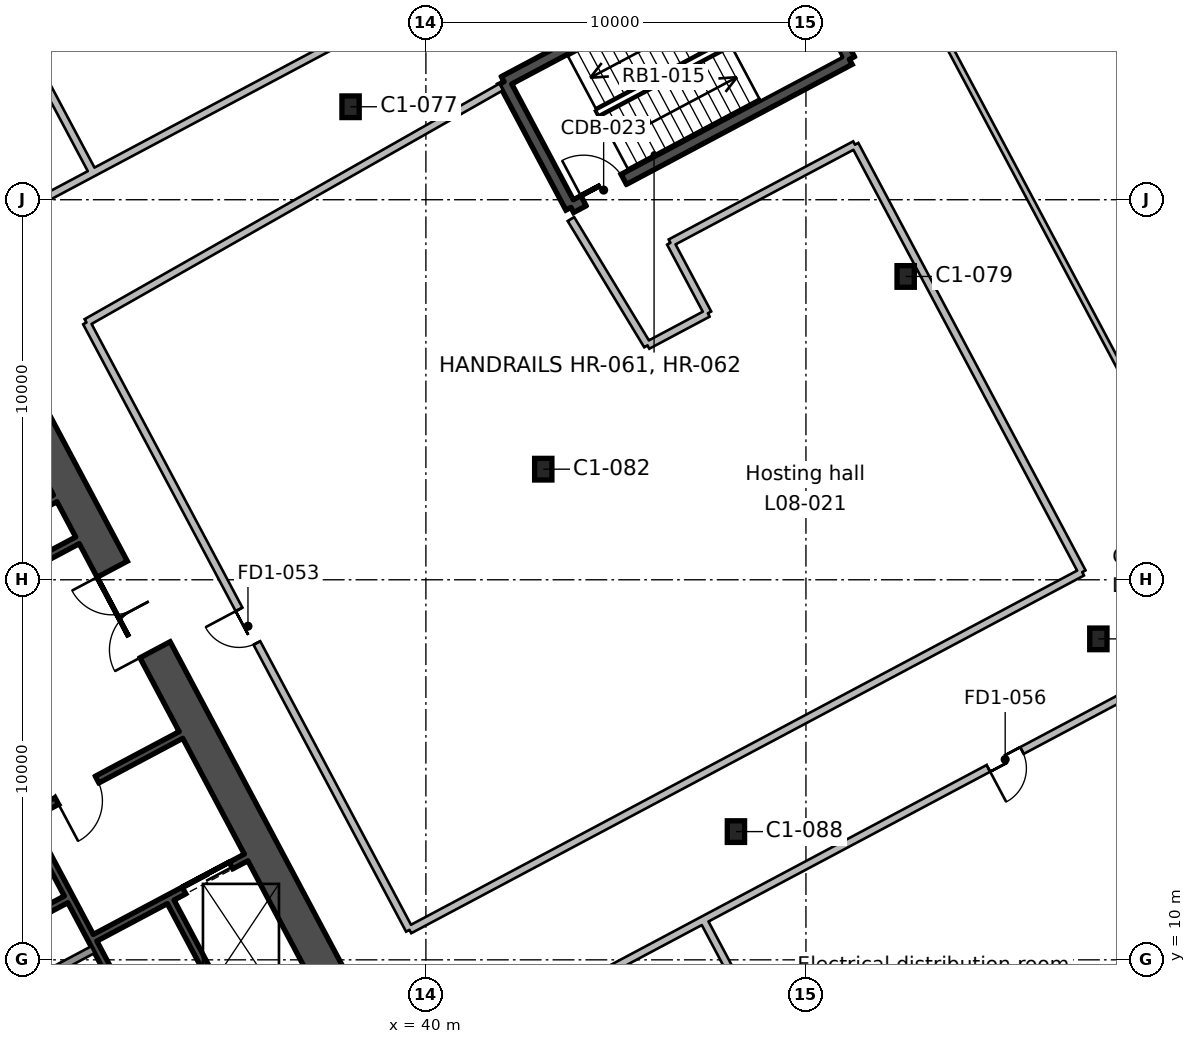
"""IFC4 building model, lengths in metres.
Left out: names, types, materials, properties, quantities, classifications, styles, units other than length and angle.
Written with IfcOpenShell. Run it as: python <this file> out.ifc"""

import sys

from ifc_helpers import new_model, si_unit, direction, frame, frame_2d, origin, origin_2d, place, context, subcontext, project, spatial, rectangle, i_section, extrude, element, fill, save


model = new_model("IFC4")
c1 = context("Model", 3, precision=1e-05, world=origin(), true_north=direction((0.0, 1.0)))
c2 = subcontext(c1, "Body", "Model", "MODEL_VIEW")
j1 = project(units=[si_unit("LENGTHUNIT", "METRE"), si_unit("PLANEANGLEUNIT", "RADIAN")], contexts=[c1])
p1 = place(None, origin())
s1 = spatial("IfcSite", under=j1, at=p1, CompositionType="ELEMENT")
p2 = place(p1, origin())
s2 = spatial("IfcBuilding", under=s1, at=p2, CompositionType="ELEMENT")
p3 = place(p2, frame((0.0, 0.0, 44.6)))
s3 = spatial("IfcBuildingStorey", under=s2, at=p3, CompositionType="ELEMENT", Elevation=44.6)
for number, where, z_axis, x_axis in (
    (1, (48.158, 13.374, 0.0), (0.0, 0.0, 1.0), (1.0, 0.0, 0.0)),
    (2, (57.694, 18.445, 0.0), (0.0, 0.0, 1.0), (1.0, 0.0, 0.0)),
    (3, (43.088, 22.91, 0.0), (0.0, 0.0, 1.0), (1.0, 0.0, 0.0)),
    (4, (52.624, 27.981, 0.0), (0.0, 0.0, 1.0), (1.0, 0.0, 0.0)),
    (5, (38.018, 32.446, 0.0), (0.0, 0.0, 1.0), (1.0, 0.0, 0.0)),
):
    element("IfcColumn", number, at=place(p3, frame(where, z_axis=z_axis, x_axis=x_axis)), inside=s3, PredefinedType="COLUMN", context=c2, shape_type="SweptSolid", body=[
        extrude(i_section(OverallWidth=0.455, OverallDepth=0.569, WebThickness=0.078, FlangeThickness=0.125, FilletRadius=0.015, at=origin_2d()), origin(), (0.0, 0.0, 1.0), 5.4),
    ])
p4 = place(p3, frame((37.849, 8.799, 0.0), z_axis=(0.0, 0.0, 1.0), x_axis=(-0.469465789982, 0.882950662289, 0.0)))
e6 = element("IfcWall", 6, at=p4, inside=s3, PredefinedType="SHEAR", context=c2, shape_type="SweptSolid", body=[
    extrude(rectangle(XDim=20.0, YDim=0.9, at=frame_2d((10.0, 0.0))), origin(), (0.0, 0.0, 1.0), 5.4),
])
p5 = place(p4, frame((10.6, 0.0, 0.0)))
e7 = element("IfcOpeningElement", 7, at=p5, cuts=e6, PredefinedType="OPENING", context=c2, shape_type="SweptSolid", body=[
    extrude(rectangle(XDim=2.4, YDim=2.4, at=frame_2d((1.2, 1.2))), frame((0.0, 0.46, 0.0), z_axis=(0.0, -1.0, 0.0), x_axis=(1.0, 0.0, 0.0)), (0.0, 0.0, 1.0), 0.92),
])
p6 = place(p3, frame((32.968, 7.223, 0.0), z_axis=(0.0, 0.0, 1.0), x_axis=(-0.469480409012, 0.88294288918, 0.0)))
e8 = element("IfcWall", 8, at=p6, inside=s3, PredefinedType="SHEAR", context=c2, shape_type="SweptSolid", body=[
    extrude(rectangle(XDim=7.3, YDim=0.2, at=frame_2d((3.65, 0.0))), origin(), (0.0, 0.0, 1.0), 5.4),
])
p7 = place(p3, frame((34.999, 8.303, 0.0), z_axis=(0.0, 0.0, 1.0), x_axis=(-0.4694665462, 0.882950260207, 0.0)))
e9 = element("IfcWall", 9, at=p7, inside=s3, PredefinedType="SHEAR", context=c2, shape_type="SweptSolid", body=[
    extrude(rectangle(XDim=3.65, YDim=0.2, at=frame_2d((1.825, 0.0))), origin(), (0.0, 0.0, 1.0), 5.4),
])
p8 = place(p3, frame((26.645, 7.825, 0.0), z_axis=(0.0, 0.0, 1.0), x_axis=(0.882953967957, 0.469459572775, 0.0)))
e10 = element("IfcWall", 10, at=p8, inside=s3, PredefinedType="SOLIDWALL", context=c2, shape_type="SweptSolid", body=[
    extrude(rectangle(XDim=5.2, YDim=0.2, at=frame_2d((2.6, 0.0))), origin(), (0.0, 0.0, 1.0), 5.4),
])
p9 = place(p3, frame((31.296, 10.581, 0.0), z_axis=(0.0, 0.0, 1.0), x_axis=(0.882960433586, 0.469447412093, 0.0)))
e11 = element("IfcWall", 11, at=p9, inside=s3, PredefinedType="SHEAR", context=c2, shape_type="SweptSolid", body=[
    extrude(rectangle(XDim=4.5, YDim=0.2, at=frame_2d((2.25, 0.0))), origin(), (0.0, 0.0, 1.0), 5.4),
])
p10 = place(p9, frame((2.65, 0.0, 0.0)))
e12 = element("IfcOpeningElement", 12, at=p10, cuts=e11, PredefinedType="OPENING", context=c2, shape_type="SweptSolid", body=[
    extrude(rectangle(XDim=1.4, YDim=2.4, at=frame_2d((0.7, 1.2))), frame((0.0, 0.11, 0.0), z_axis=(0.0, -1.0, 0.0), x_axis=(1.0, 0.0, 0.0)), (0.0, 0.0, 1.0), 0.22),
])
p11 = place(p3, frame((25.941, 9.15, 0.0), z_axis=(0.0, 0.0, 1.0), x_axis=(0.882953967957, 0.469459572775, 0.0)))
e13 = element("IfcWall", 13, at=p11, inside=s3, PredefinedType="SHEAR", context=c2, shape_type="SweptSolid", body=[
    extrude(rectangle(XDim=5.2, YDim=0.2, at=frame_2d((2.6, 0.0))), origin(), (0.0, 0.0, 1.0), 5.4),
])
p12 = place(p3, frame((24.726, 11.222, 0.0), z_axis=(0.0, 0.0, 1.0), x_axis=(0.882940221191, 0.469485426614, 0.0)))
e14 = element("IfcWall", 14, at=p12, inside=s3, PredefinedType="SHEAR", context=c2, shape_type="SweptSolid", body=[
    extrude(rectangle(XDim=10.0, YDim=0.2, at=frame_2d((5.0, 0.0))), origin(), (0.0, 0.0, 1.0), 5.4),
])
p13 = place(p12, frame((6.3, 0.0, 0.0)))
e15 = element("IfcOpeningElement", 15, at=p13, cuts=e14, PredefinedType="OPENING", context=c2, shape_type="SweptSolid", body=[
    extrude(rectangle(XDim=1.2, YDim=2.1, at=frame_2d((0.6, 1.05))), frame((0.0, 0.11, 0.0), z_axis=(0.0, -1.0, 0.0), x_axis=(1.0, 0.0, 0.0)), (0.0, 0.0, 1.0), 0.22),
])
p14 = place(p12, frame((0.36, 0.0, 0.0)))
e16 = element("IfcOpeningElement", 16, at=p14, cuts=e14, PredefinedType="OPENING", context=c2, shape_type="SweptSolid", body=[
    extrude(rectangle(XDim=0.9, YDim=2.1, at=frame_2d((0.45, 1.05))), frame((0.0, 0.11, 0.0), z_axis=(0.0, -1.0, 0.0), x_axis=(1.0, 0.0, 0.0)), (0.0, 0.0, 1.0), 0.22),
])
p15 = place(p12, frame((3.06, 0.0, 0.0)))
e17 = element("IfcOpeningElement", 17, at=p15, cuts=e14, PredefinedType="OPENING", context=c2, shape_type="SweptSolid", body=[
    extrude(rectangle(XDim=0.9, YDim=2.1, at=frame_2d((0.45, 1.05))), frame((0.0, 0.11, 0.0), z_axis=(0.0, -1.0, 0.0), x_axis=(1.0, 0.0, 0.0)), (0.0, 0.0, 1.0), 0.22),
])
p16 = place(p3, frame((23.769, 17.282, 0.0), z_axis=(0.0, 0.0, 1.0), x_axis=(0.882940221191, 0.469485426614, 0.0)))
e18 = element("IfcWall", 18, at=p16, inside=s3, PredefinedType="SHEAR", context=c2, shape_type="SweptSolid", body=[
    extrude(rectangle(XDim=8.0, YDim=0.2, at=frame_2d((4.0, 0.0))), origin(), (0.0, 0.0, 1.0), 5.4),
])
p17 = place(p3, frame((23.182, 18.385, 0.0), z_axis=(0.0, 0.0, 1.0), x_axis=(0.88295287151, 0.469461634952, 0.0)))
e19 = element("IfcWall", 19, at=p17, inside=s3, PredefinedType="SHEAR", context=c2, shape_type="SweptSolid", body=[
    extrude(rectangle(XDim=8.0, YDim=0.2, at=frame_2d((4.0, 0.0))), origin(), (0.0, 0.0, 1.0), 5.4),
])
p18 = place(p3, frame((49.384, 37.004, 0.0), z_axis=(0.0, 0.0, 1.0), x_axis=(0.46946936446, -0.882948761726, 0.0)))
e20 = element("IfcWall", 20, at=p18, inside=s3, PredefinedType="SHEAR", context=c2, shape_type="SweptSolid", body=[
    extrude(rectangle(XDim=3.75, YDim=0.3, at=frame_2d((1.875, 0.0))), origin(), (0.0, 0.0, 1.0), 5.4),
])
p19 = place(p3, frame((51.145, 33.693, 0.0), z_axis=(0.0, 0.0, 1.0), x_axis=(-0.882945809314, -0.469474917132, 0.0)))
e21 = element("IfcWall", 21, at=p19, inside=s3, PredefinedType="SHEAR", context=c2, shape_type="SweptSolid", body=[
    extrude(rectangle(XDim=8.3, YDim=0.3, at=frame_2d((4.15, 0.0))), origin(), (0.0, 0.0, 1.0), 5.4),
])
p20 = place(p19, frame((6.725, 0.0, 0.0)))
e22 = element("IfcOpeningElement", 22, at=p20, cuts=e21, PredefinedType="OPENING", context=c2, shape_type="SweptSolid", body=[
    extrude(rectangle(XDim=1.2, YDim=2.1, at=frame_2d((0.6, 1.05))), frame((0.0, 0.16, 0.0), z_axis=(0.0, -1.0, 0.0), x_axis=(1.0, 0.0, 0.0)), (0.0, 0.0, 1.0), 0.32),
])
p21 = place(p3, frame((43.816, 29.796, 0.0), z_axis=(0.0, 0.0, 1.0), x_axis=(-0.46946936446, 0.882948761726, 0.0)))
e23 = element("IfcWall", 23, at=p21, inside=s3, PredefinedType="SHEAR", context=c2, shape_type="SweptSolid", body=[
    extrude(rectangle(XDim=3.75, YDim=0.3, at=frame_2d((1.875, 0.0))), origin(), (0.0, 0.0, 1.0), 5.4),
])
p22 = place(p3, frame((42.055, 33.107, 0.0), z_axis=(0.0, 0.0, 1.0), x_axis=(0.882945809314, 0.469474917132, 0.0)))
e24 = element("IfcWall", 24, at=p22, inside=s3, PredefinedType="SHEAR", context=c2, shape_type="SweptSolid", body=[
    extrude(rectangle(XDim=8.3, YDim=0.3, at=frame_2d((4.15, 0.0))), origin(), (0.0, 0.0, 1.0), 5.4),
])
p23 = place(p3, frame((0.0, 14.1, 0.0), z_axis=(0.0, 0.0, 1.0), x_axis=(0.882945550769, 0.469475403378, 0.0)))
e25 = element("IfcWall", 25, at=p23, inside=s3, PredefinedType="PARTITIONING", context=c2, shape_type="SweptSolid", body=[
    extrude(rectangle(XDim=35.938, YDim=0.2, at=frame_2d((17.969, 0.0))), origin(), (0.0, 0.0, 1.0), 4.95),
])
p24 = place(p23, frame((30.95, 0.0, 0.0)))
e26 = element("IfcOpeningElement", 26, at=p24, cuts=e25, PredefinedType="OPENING", context=c2, shape_type="SweptSolid", body=[
    extrude(rectangle(XDim=1.0, YDim=2.1, at=frame_2d((0.5, 1.05))), frame((0.0, 0.11, 0.0), z_axis=(0.0, -1.0, 0.0), x_axis=(1.0, 0.0, 0.0)), (0.0, 0.0, 1.0), 0.22),
])
p25 = place(p23, frame((20.45, 0.0, 0.0)))
e27 = element("IfcOpeningElement", 27, at=p25, cuts=e25, PredefinedType="OPENING", context=c2, shape_type="SweptSolid", body=[
    extrude(rectangle(XDim=1.0, YDim=2.1, at=frame_2d((0.5, 1.05))), frame((0.0, 0.11, 0.0), z_axis=(0.0, -1.0, 0.0), x_axis=(1.0, 0.0, 0.0)), (0.0, 0.0, 1.0), 0.22),
])
p26 = place(p23, frame((17.45, 0.0, 0.0)))
e28 = element("IfcOpeningElement", 28, at=p26, cuts=e25, PredefinedType="OPENING", context=c2, shape_type="SweptSolid", body=[
    extrude(rectangle(XDim=1.0, YDim=2.1, at=frame_2d((0.5, 1.05))), frame((0.0, 0.11, 0.0), z_axis=(0.0, -1.0, 0.0), x_axis=(1.0, 0.0, 0.0)), (0.0, 0.0, 1.0), 0.22),
])
p27 = place(p3, frame((47.301, 11.05, 0.0), z_axis=(0.0, 0.0, 1.0), x_axis=(-0.882949285086, -0.469468380155, 0.0)))
e29 = element("IfcWall", 29, at=p27, inside=s3, PredefinedType="PARTITIONING", context=c2, shape_type="SweptSolid", body=[
    extrude(rectangle(XDim=38.169, YDim=0.2, at=frame_2d((19.084, 0.0))), origin(), (0.0, 0.0, 1.0), 4.95),
])
p28 = place(p27, frame((18.55, 0.0, 0.0)))
e30 = element("IfcOpeningElement", 30, at=p28, cuts=e29, PredefinedType="OPENING", context=c2, shape_type="SweptSolid", body=[
    extrude(rectangle(XDim=1.0, YDim=2.1, at=frame_2d((0.5, 1.05))), frame((0.0, 0.11, 0.0), z_axis=(0.0, -1.0, 0.0), x_axis=(1.0, 0.0, 0.0)), (0.0, 0.0, 1.0), 0.22),
])
p29 = place(p27, frame((15.35, 0.0, 0.0)))
e31 = element("IfcOpeningElement", 31, at=p29, cuts=e29, PredefinedType="OPENING", context=c2, shape_type="SweptSolid", body=[
    extrude(rectangle(XDim=1.0, YDim=2.1, at=frame_2d((0.5, 1.05))), frame((0.0, 0.11, 0.0), z_axis=(0.0, -1.0, 0.0), x_axis=(1.0, 0.0, 0.0)), (0.0, 0.0, 1.0), 0.22),
])
p30 = place(p3, frame((31.23, 30.726, 0.0), z_axis=(0.0, 0.0, 1.0), x_axis=(-0.469403649121, 0.882983699845, 0.0)))
e32 = element("IfcWall", 32, at=p30, inside=s3, PredefinedType="PARTITIONING", context=c2, shape_type="SweptSolid", body=[
    extrude(rectangle(XDim=5.532, YDim=0.2, at=frame_2d((2.766, 0.0))), origin(), (0.0, 0.0, 1.0), 4.95),
])
p31 = place(p3, frame((31.731, 30.972, 0.0), z_axis=(0.0, 0.0, 1.0), x_axis=(0.88293515824, 0.469494948156, 0.0)))
e33 = element("IfcWall", 33, at=p31, inside=s3, PredefinedType="PARTITIONING", context=c2, shape_type="SweptSolid", body=[
    extrude(rectangle(XDim=20.893, YDim=0.2, at=frame_2d((10.446, 0.0))), origin(), (0.0, 0.0, 1.0), 4.95),
])
p32 = place(p31, frame((9.95, 0.0, 0.0)))
e34 = element("IfcOpeningElement", 34, at=p32, cuts=e33, PredefinedType="OPENING", context=c2, shape_type="SweptSolid", body=[
    extrude(rectangle(XDim=1.0, YDim=2.1, at=frame_2d((0.5, 1.05))), frame((0.0, 0.11, 0.0), z_axis=(0.0, -1.0, 0.0), x_axis=(1.0, 0.0, 0.0)), (0.0, 0.0, 1.0), 0.22),
])
p33 = place(p3, frame((47.301, 11.05, 0.0), z_axis=(0.0, 0.0, 1.0), x_axis=(0.469461194384, -0.882953105758, 0.0)))
e35 = element("IfcWall", 35, at=p33, inside=s3, PredefinedType="PARTITIONING", context=c2, shape_type="SweptSolid", body=[
    extrude(rectangle(XDim=8.75, YDim=0.2, at=frame_2d((4.375, 0.0))), origin(), (0.0, 0.0, 1.0), 4.95),
])
p34 = place(p3, frame((48.541, 15.56, 0.0), z_axis=(0.0, 0.0, 1.0), x_axis=(-0.882933406877, -0.469498241765, 0.0)))
e36 = element("IfcWall", 36, at=p34, inside=s3, PredefinedType="PARTITIONING", context=c2, shape_type="SweptSolid", body=[
    extrude(rectangle(XDim=10.164, YDim=0.2, at=frame_2d((5.082, 0.0))), origin(), (0.0, 0.0, 1.0), 4.95),
])
p35 = place(p3, frame((39.567, 10.788, 0.0), z_axis=(0.0, 0.0, 1.0), x_axis=(-0.469474056812, 0.882946266757, 0.0)))
e37 = element("IfcWall", 37, at=p35, inside=s3, PredefinedType="PARTITIONING", context=c2, shape_type="SweptSolid", body=[
    extrude(rectangle(XDim=18.101, YDim=0.2, at=frame_2d((9.05, 0.0))), origin(), (0.0, 0.0, 1.0), 4.95),
])
p36 = place(p35, frame((8.55, 0.0, 0.0)))
e38 = element("IfcOpeningElement", 38, at=p36, cuts=e37, PredefinedType="OPENING", context=c2, shape_type="SweptSolid", body=[
    extrude(rectangle(XDim=1.0, YDim=2.1, at=frame_2d((0.5, 1.05))), frame((0.0, 0.11, 0.0), z_axis=(0.0, -1.0, 0.0), x_axis=(1.0, 0.0, 0.0)), (0.0, 0.0, 1.0), 0.22),
])
p37 = place(p3, frame((31.069, 26.77, 0.0), z_axis=(0.0, 0.0, 1.0), x_axis=(0.86954617394, 0.493851649168, 0.0)))
e39 = element("IfcWall", 39, at=p37, inside=s3, PredefinedType="PARTITIONING", context=c2, shape_type="SweptSolid", body=[
    extrude(rectangle(XDim=12.55, YDim=0.2, at=frame_2d((6.275, 0.0))), origin(), (0.0, 0.0, 1.0), 4.95),
])
p38 = place(p3, frame((43.816, 29.491, 0.0), z_axis=(0.0, 0.0, 1.0), x_axis=(0.518473208291, -0.855093873376, 0.0)))
e40 = element("IfcWall", 40, at=p38, inside=s3, PredefinedType="PARTITIONING", context=c2, shape_type="SweptSolid", body=[
    extrude(rectangle(XDim=1.325, YDim=0.2, at=frame_2d((0.663, 0.0))), origin(), (0.0, 0.0, 1.0), 4.95),
])
p39 = place(p3, frame((45.831, 26.167, 0.0), z_axis=(0.0, 0.0, 1.0), x_axis=(-0.518386189645, 0.855146629757, 0.0)))
e41 = element("IfcWall", 41, at=p39, inside=s3, PredefinedType="PARTITIONING", context=c2, shape_type="SweptSolid", body=[
    extrude(rectangle(XDim=2.562, YDim=0.2, at=frame_2d((1.281, 0.0))), origin(), (0.0, 0.0, 1.0), 4.95),
])
p40 = place(p3, frame((47.42, 27.012, 0.0), z_axis=(0.0, 0.0, 1.0), x_axis=(-0.882911879422, -0.469538723829, 0.0)))
e42 = element("IfcWall", 42, at=p40, inside=s3, PredefinedType="PARTITIONING", context=c2, shape_type="SweptSolid", body=[
    extrude(rectangle(XDim=1.8, YDim=0.2, at=frame_2d((0.9, 0.0))), origin(), (0.0, 0.0, 1.0), 4.95),
])
p41 = place(p3, frame((46.434, 28.866, 0.0), z_axis=(0.0, 0.0, 1.0), x_axis=(0.882942083458, 0.469481924316, 0.0)))
e43 = element("IfcWall", 43, at=p41, inside=s3, PredefinedType="PARTITIONING", context=c2, shape_type="SweptSolid", body=[
    extrude(rectangle(XDim=5.5, YDim=0.2, at=frame_2d((2.75, 0.0))), origin(), (0.0, 0.0, 1.0), 4.95),
])
p42 = place(p3, frame((51.29, 31.448, 0.0), z_axis=(0.0, 0.0, 1.0), x_axis=(0.469459757109, -0.882953869947, 0.0)))
e44 = element("IfcWall", 44, at=p42, inside=s3, PredefinedType="PARTITIONING", context=c2, shape_type="SweptSolid", body=[
    extrude(rectangle(XDim=12.738, YDim=0.2, at=frame_2d((6.369, 0.0))), origin(), (0.0, 0.0, 1.0), 4.95),
])
p43 = place(p3, frame((57.27, 20.201, 0.0), z_axis=(0.0, 0.0, 1.0), x_axis=(-0.882965394181, -0.469438081837, 0.0)))
e45 = element("IfcWall", 45, at=p43, inside=s3, PredefinedType="PARTITIONING", context=c2, shape_type="SweptSolid", body=[
    extrude(rectangle(XDim=9.886, YDim=0.2, at=frame_2d((4.943, 0.0))), origin(), (0.0, 0.0, 1.0), 4.95),
])
p44 = place(p3, frame((47.42, 27.012, 0.0), z_axis=(0.0, 0.0, 1.0), x_axis=(-0.469489562011, 0.882938022266, 0.0)))
e46 = element("IfcWall", 46, at=p44, inside=s3, PredefinedType="PARTITIONING", context=c2, shape_type="SweptSolid", body=[
    extrude(rectangle(XDim=2.1, YDim=0.2, at=frame_2d((1.05, 0.0))), origin(), (0.0, 0.0, 1.0), 4.95),
])
p45 = place(p3, frame((48.576, 11.728, 0.0), z_axis=(0.0, 0.0, 1.0), x_axis=(-0.882918621496, -0.469526045939, 0.0)))
e47 = element("IfcWall", 47, at=p45, inside=s3, PredefinedType="PARTITIONING", context=c2, shape_type="SweptSolid", body=[
    extrude(rectangle(XDim=1.444, YDim=0.2, at=frame_2d((0.722, 0.0))), origin(), (0.0, 0.0, 1.0), 4.95),
])
p46 = place(p3, frame((48.576, 11.728, 0.0), z_axis=(0.0, 0.0, 1.0), x_axis=(0.88294872662, 0.469469430486, 0.0)))
e48 = element("IfcWall", 48, at=p46, inside=s3, PredefinedType="PARTITIONING", context=c2, shape_type="SweptSolid", body=[
    extrude(rectangle(XDim=15.091, YDim=0.2, at=frame_2d((7.546, 0.0))), origin(), (0.0, 0.0, 1.0), 4.95),
])
p47 = place(p46, frame((7.05, 0.0, 0.0)))
e49 = element("IfcOpeningElement", 49, at=p47, cuts=e48, PredefinedType="OPENING", context=c2, shape_type="SweptSolid", body=[
    extrude(rectangle(XDim=1.0, YDim=2.1, at=frame_2d((0.5, 1.05))), frame((0.0, 0.11, 0.0), z_axis=(0.0, -1.0, 0.0), x_axis=(1.0, 0.0, 0.0)), (0.0, 0.0, 1.0), 0.22),
])
p48 = place(p3, frame((51.795, 37.739, 0.0), z_axis=(0.0, 0.0, 1.0), x_axis=(0.469480492676, -0.882942844694, 0.0)))
e50 = element("IfcWall", 50, at=p48, inside=s3, PredefinedType="PARTITIONING", context=c2, shape_type="SweptSolid", body=[
    extrude(rectangle(XDim=21.456, YDim=0.15, at=frame_2d((10.728, 0.0))), origin(), (0.0, 0.0, 1.0), 4.95),
])
p49 = place(p5, origin())
e51 = element("IfcDoor", 51, at=p49, inside=s3, OperationType="DOUBLE_DOOR_SINGLE_SWING", PredefinedType="DOOR", context=c2, shape_type="SweptSolid", body=[
    extrude(rectangle(XDim=2.4, YDim=2.4, at=frame_2d((1.2, 1.2))), frame((0.0, 0.025, 0.0), z_axis=(0.0, -1.0, 0.0), x_axis=(1.0, 0.0, 0.0)), (0.0, 0.0, 1.0), 0.05),
])
fill(e7, e51)
p50 = place(p13, frame((1.2, 0.0, 0.0), z_axis=(0.0, 0.0, 1.0), x_axis=(-1.0, 0.0, 0.0)))
e52 = element("IfcDoor", 52, at=p50, inside=s3, OperationType="SINGLE_SWING_RIGHT", PredefinedType="DOOR", context=c2, shape_type="SweptSolid", body=[
    extrude(rectangle(XDim=1.2, YDim=2.1, at=frame_2d((0.6, 1.05))), frame((0.0, 0.025, 0.0), z_axis=(0.0, -1.0, 0.0), x_axis=(1.0, 0.0, 0.0)), (0.0, 0.0, 1.0), 0.05),
])
fill(e15, e52)
p51 = place(p10, origin())
e53 = element("IfcDoor", 53, at=p51, inside=s3, OperationType="DOUBLE_DOOR_SLIDING", PredefinedType="DOOR", context=c2, shape_type="SweptSolid", body=[
    extrude(rectangle(XDim=1.4, YDim=2.4, at=frame_2d((0.7, 1.2))), frame((0.0, 0.025, 0.0), z_axis=(0.0, -1.0, 0.0), x_axis=(1.0, 0.0, 0.0)), (0.0, 0.0, 1.0), 0.05),
])
fill(e12, e53)
p52 = place(p20, frame((1.2, 0.0, 0.0), z_axis=(0.0, 0.0, 1.0), x_axis=(-1.0, 0.0, 0.0)))
e54 = element("IfcDoor", 54, at=p52, inside=s3, OperationType="SINGLE_SWING_LEFT", PredefinedType="DOOR", context=c2, shape_type="SweptSolid", body=[
    extrude(rectangle(XDim=1.2, YDim=2.1, at=frame_2d((0.6, 1.05))), frame((0.0, 0.025, 0.0), z_axis=(0.0, -1.0, 0.0), x_axis=(1.0, 0.0, 0.0)), (0.0, 0.0, 1.0), 0.05),
])
fill(e22, e54)
p53 = place(p47, frame((1.0, 0.0, 0.0), z_axis=(0.0, 0.0, 1.0), x_axis=(-1.0, 0.0, 0.0)))
e55 = element("IfcDoor", 55, at=p53, inside=s3, OperationType="SINGLE_SWING_RIGHT", PredefinedType="DOOR", context=c2, shape_type="SweptSolid", body=[
    extrude(rectangle(XDim=1.0, YDim=2.1, at=frame_2d((0.5, 1.05))), frame((0.0, 0.025, 0.0), z_axis=(0.0, -1.0, 0.0), x_axis=(1.0, 0.0, 0.0)), (0.0, 0.0, 1.0), 0.05),
])
fill(e49, e55)
p54 = place(p36, origin())
e56 = element("IfcDoor", 56, at=p54, inside=s3, OperationType="SINGLE_SWING_RIGHT", PredefinedType="DOOR", context=c2, shape_type="SweptSolid", body=[
    extrude(rectangle(XDim=1.0, YDim=2.1, at=frame_2d((0.5, 1.05))), frame((0.0, 0.025, 0.0), z_axis=(0.0, -1.0, 0.0), x_axis=(1.0, 0.0, 0.0)), (0.0, 0.0, 1.0), 0.05),
])
fill(e38, e56)
save(model, sys.argv[1])
